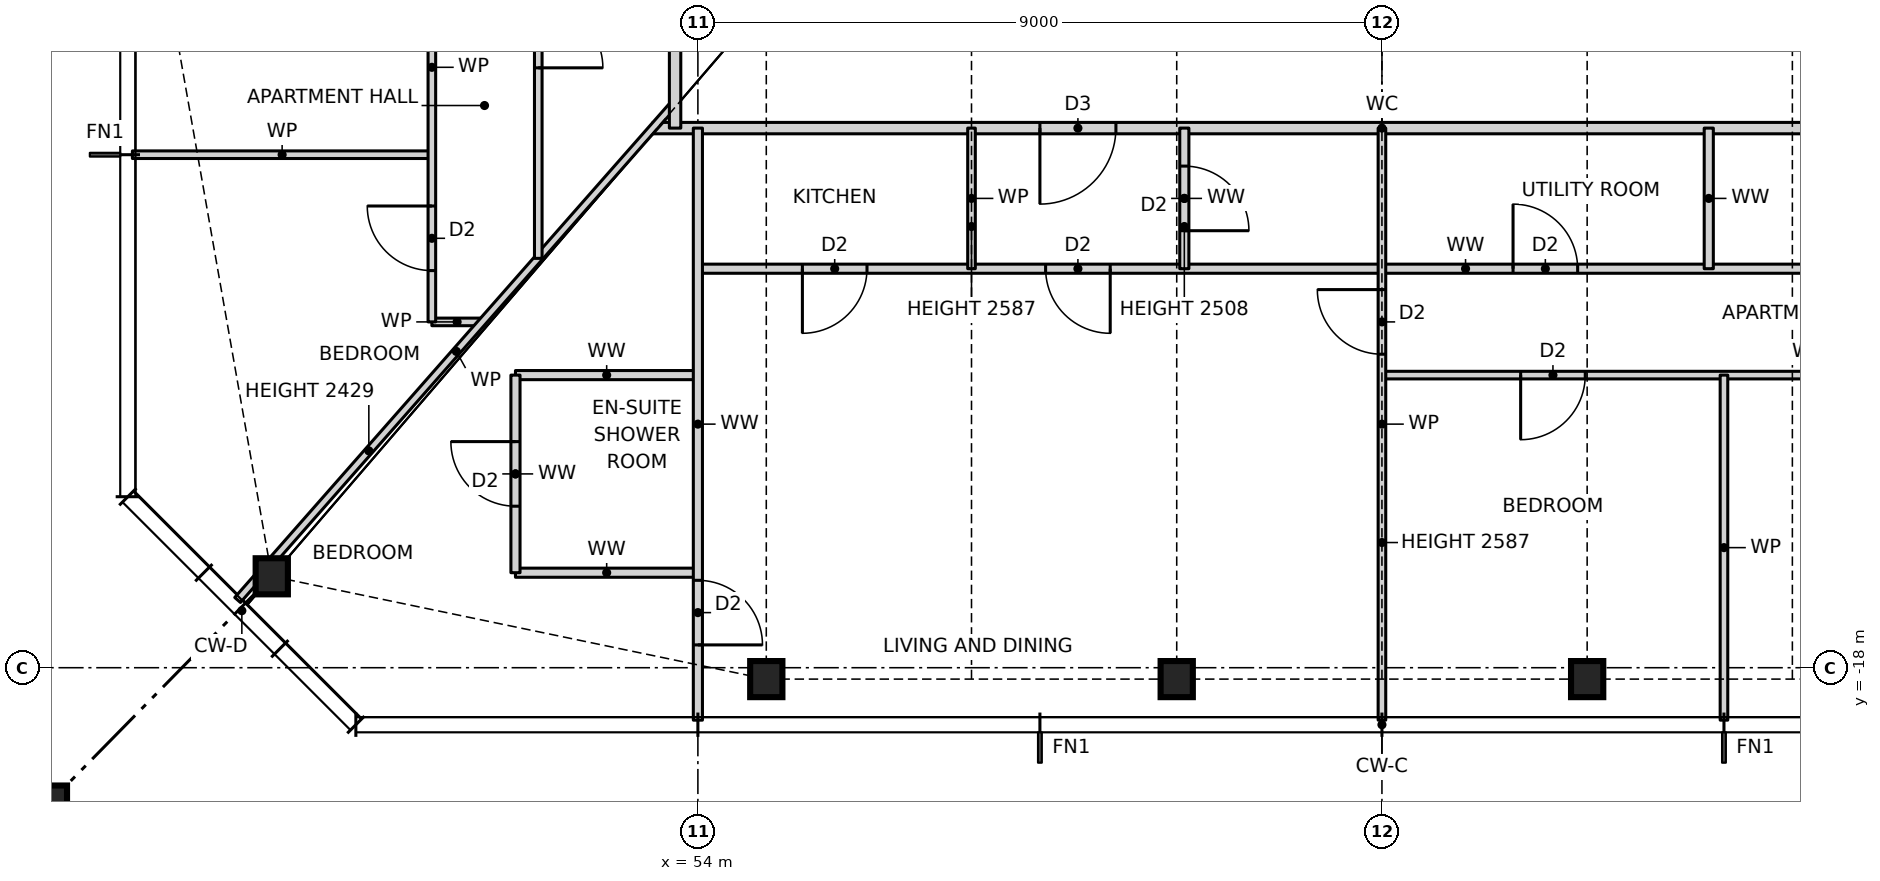
"""IFC4 building model, lengths in metres.
Left out: names, types, materials, properties, quantities, classifications, styles, units other than length and angle.
Written with IfcOpenShell. Run it as: python <this file> out.ifc"""

import sys

from ifc_helpers import new_model, si_unit, direction, frame, frame_2d, origin, origin_2d, place, context, subcontext, project, spatial, rectangle, hollow_rectangle, i_section, extrude, element, fill, save


model = new_model("IFC4")
c1 = context("Model", 3, precision=1e-05, world=origin(), true_north=direction((0.0, 1.0)))
c2 = subcontext(c1, "Body", "Model", "MODEL_VIEW")
j1 = project(units=[si_unit("LENGTHUNIT", "METRE"), si_unit("PLANEANGLEUNIT", "RADIAN")], contexts=[c1])
p1 = place(None, origin())
s1 = spatial("IfcSite", under=j1, at=p1, CompositionType="ELEMENT")
p2 = place(p1, origin())
s2 = spatial("IfcBuilding", under=s1, at=p2, CompositionType="ELEMENT")
p3 = place(p2, frame((0.0, 0.0, 18.5)))
s3 = spatial("IfcBuildingStorey", under=s2, at=p3, CompositionType="ELEMENT", Elevation=18.5)
for number, where, z_axis, x_axis in (
    (1, (48.394, -16.797, 0.0), (0.0, 0.0, 1.0), (1.0, 0.0, 0.0)),
    (2, (54.9, -18.15, 0.0), (0.0, 0.0, 1.0), (1.0, 0.0, 0.0)),
    (3, (60.3, -18.15, 0.0), (0.0, 0.0, 1.0), (1.0, 0.0, 0.0)),
    (4, (65.7, -18.15, 0.0), (0.0, 0.0, 1.0), (1.0, 0.0, 0.0)),
):
    element("IfcColumn", number, at=place(p3, frame(where, z_axis=z_axis, x_axis=x_axis)), inside=s3, PredefinedType="COLUMN", context=c2, shape_type="SweptSolid", body=[
        extrude(i_section(OverallWidth=0.424, OverallDepth=0.475, WebThickness=0.048, FlangeThickness=0.077, at=origin_2d()), origin(), (0.0, 0.0, 1.0), 3.5),
    ])
p4 = place(p3, frame((45.1, -20.15, 0.0), z_axis=(0.0, 0.0, 1.0), x_axis=(1.0, 0.0, 0.0)))
e5 = element("IfcColumn", 5, at=p4, inside=s3, PredefinedType="COLUMN", context=c2, shape_type="SweptSolid", body=[
    extrude(hollow_rectangle(XDim=1.2, YDim=1.2, WallThickness=0.07, at=origin_2d()), origin(), (0.0, 0.0, 1.0), 3.5),
])
for number, where, z_axis, x_axis in (
    (6, (51.6, -16.75, 0.0), (0.0, 0.0, 1.0), (1.0, 0.0, 0.0)),
    (7, (51.6, -14.15, 0.0), (0.0, 0.0, 1.0), (1.0, 0.0, 0.0)),
):
    element("IfcWall", number, at=place(p3, frame(where, z_axis=z_axis, x_axis=x_axis)), inside=s3, PredefinedType="PARTITIONING", context=c2, shape_type="SweptSolid", body=[
        extrude(rectangle(XDim=2.4, YDim=0.12, at=frame_2d((1.2, 0.0))), origin(), (0.0, 0.0, 1.0), 3.27),
    ])
p5 = place(p3, frame((63.0, -14.15, 0.0), z_axis=(0.0, 0.0, 1.0), x_axis=(1.0, 0.0, 0.0)))
e8 = element("IfcWall", 8, at=p5, inside=s3, PredefinedType="PARTITIONING", context=c2, shape_type="SweptSolid", body=[
    extrude(rectangle(XDim=11.2, YDim=0.1, at=frame_2d((5.6, 0.0))), origin(), (0.0, 0.0, 1.0), 3.27),
])
p6 = place(p5, frame((1.825, 0.0, 0.0)))
e9 = element("IfcOpeningElement", 9, at=p6, cuts=e8, PredefinedType="OPENING", context=c2, shape_type="SweptSolid", body=[
    extrude(rectangle(XDim=0.85, YDim=2.1, at=frame_2d((0.425, 1.05))), frame((0.0, 0.06, 0.0), z_axis=(0.0, -1.0, 0.0), x_axis=(1.0, 0.0, 0.0)), (0.0, 0.0, 1.0), 0.12),
])
p7 = place(p5, frame((6.325, 0.0, 0.0)))
e10 = element("IfcOpeningElement", 10, at=p7, cuts=e8, PredefinedType="OPENING", context=c2, shape_type="SweptSolid", body=[
    extrude(rectangle(XDim=0.85, YDim=2.1, at=frame_2d((0.425, 1.05))), frame((0.0, 0.06, 0.0), z_axis=(0.0, -1.0, 0.0), x_axis=(1.0, 0.0, 0.0)), (0.0, 0.0, 1.0), 0.12),
])
p8 = place(p5, frame((9.675, 0.0, 0.0)))
e11 = element("IfcOpeningElement", 11, at=p8, cuts=e8, PredefinedType="OPENING", context=c2, shape_type="SweptSolid", body=[
    extrude(rectangle(XDim=0.85, YDim=2.1, at=frame_2d((0.425, 1.05))), frame((0.0, 0.06, 0.0), z_axis=(0.0, -1.0, 0.0), x_axis=(1.0, 0.0, 0.0)), (0.0, 0.0, 1.0), 0.12),
])
p9 = place(p3, frame((50.5, -13.45, 0.0), z_axis=(0.0, 0.0, 1.0), x_axis=(1.0, 0.0, 0.0)))
e12 = element("IfcWall", 12, at=p9, inside=s3, PredefinedType="PARTITIONING", context=c2, shape_type="SweptSolid", body=[
    extrude(rectangle(XDim=0.664, YDim=0.1, at=frame_2d((0.332, 0.0))), origin(), (0.0, 0.0, 1.0), 3.27),
])
p10 = place(p3, frame((54.0, -12.75, 0.0), z_axis=(0.0, 0.0, 1.0), x_axis=(1.0, 0.0, 0.0)))
e13 = element("IfcWall", 13, at=p10, inside=s3, PredefinedType="PARTITIONING", context=c2, shape_type="SweptSolid", body=[
    extrude(rectangle(XDim=20.2, YDim=0.12, at=frame_2d((10.1, 0.0))), origin(), (0.0, 0.0, 1.0), 3.27),
])
p11 = place(p10, frame((1.375, 0.0, 0.0)))
e14 = element("IfcOpeningElement", 14, at=p11, cuts=e13, PredefinedType="OPENING", context=c2, shape_type="SweptSolid", body=[
    extrude(rectangle(XDim=0.85, YDim=2.1, at=frame_2d((0.425, 1.05))), frame((0.0, 0.07, 0.0), z_axis=(0.0, -1.0, 0.0), x_axis=(1.0, 0.0, 0.0)), (0.0, 0.0, 1.0), 0.14),
])
p12 = place(p10, frame((4.575, 0.0, 0.0)))
e15 = element("IfcOpeningElement", 15, at=p12, cuts=e13, PredefinedType="OPENING", context=c2, shape_type="SweptSolid", body=[
    extrude(rectangle(XDim=0.85, YDim=2.1, at=frame_2d((0.425, 1.05))), frame((0.0, 0.07, 0.0), z_axis=(0.0, -1.0, 0.0), x_axis=(1.0, 0.0, 0.0)), (0.0, 0.0, 1.0), 0.14),
])
p13 = place(p10, frame((10.725, 0.0, 0.0)))
e16 = element("IfcOpeningElement", 16, at=p13, cuts=e13, PredefinedType="OPENING", context=c2, shape_type="SweptSolid", body=[
    extrude(rectangle(XDim=0.85, YDim=2.1, at=frame_2d((0.425, 1.05))), frame((0.0, 0.07, 0.0), z_axis=(0.0, -1.0, 0.0), x_axis=(1.0, 0.0, 0.0)), (0.0, 0.0, 1.0), 0.14),
])
p14 = place(p10, frame((16.325, 0.0, 0.0)))
e17 = element("IfcOpeningElement", 17, at=p14, cuts=e13, PredefinedType="OPENING", context=c2, shape_type="SweptSolid", body=[
    extrude(rectangle(XDim=0.85, YDim=2.1, at=frame_2d((0.425, 1.05))), frame((0.0, 0.07, 0.0), z_axis=(0.0, -1.0, 0.0), x_axis=(1.0, 0.0, 0.0)), (0.0, 0.0, 1.0), 0.14),
])
p15 = place(p3, frame((46.56, -11.25, 0.0), z_axis=(0.0, 0.0, 1.0), x_axis=(1.0, 0.0, 0.0)))
e18 = element("IfcWall", 18, at=p15, inside=s3, PredefinedType="PARTITIONING", context=c2, shape_type="SweptSolid", body=[
    extrude(rectangle(XDim=3.94, YDim=0.1, at=frame_2d((1.97, 0.0))), origin(), (0.0, 0.0, 1.0), 3.27),
])
p16 = place(p3, frame((53.408, -10.9, 0.0), z_axis=(0.0, 0.0, 1.0), x_axis=(1.0, 0.0, 0.0)))
e19 = element("IfcWall", 19, at=p16, inside=s3, PredefinedType="PARTITIONING", context=c2, shape_type="SweptSolid", body=[
    extrude(rectangle(XDim=19.184, YDim=0.15, at=frame_2d((9.592, 0.0))), origin(), (0.0, 0.0, 1.0), 3.27),
])
p17 = place(p16, frame((5.092, 0.0, 0.0)))
e20 = element("IfcOpeningElement", 20, at=p17, cuts=e19, PredefinedType="OPENING", context=c2, shape_type="SweptSolid", body=[
    extrude(rectangle(XDim=1.0, YDim=2.1, at=frame_2d((0.5, 1.05))), frame((0.0, 0.085, 0.0), z_axis=(0.0, -1.0, 0.0), x_axis=(1.0, 0.0, 0.0)), (0.0, 0.0, 1.0), 0.17),
])
p18 = place(p3, frame((47.944, -17.109, 0.0), z_axis=(0.0, 0.0, 1.0), x_axis=(0.660612734851, 0.750726857487, 0.0)))
e21 = element("IfcWall", 21, at=p18, inside=s3, PredefinedType="PARTITIONING", context=c2, shape_type="SweptSolid", body=[
    extrude(rectangle(XDim=8.713, YDim=0.1, at=frame_2d((4.356, 0.0))), origin(), (0.0, 0.0, 1.0), 2.429),
])
p19 = place(p3, frame((67.5, -18.69, 0.0), z_axis=(0.0, 0.0, 1.0), x_axis=(0.0, 1.0, 0.0)))
e22 = element("IfcWall", 22, at=p19, inside=s3, PredefinedType="PARTITIONING", context=c2, shape_type="SweptSolid", body=[
    extrude(rectangle(XDim=4.54, YDim=0.1, at=frame_2d((2.27, 0.0))), origin(), (0.0, 0.0, 1.0), 3.27),
])
p20 = place(p3, frame((67.3, -12.75, 0.0), z_axis=(0.0, 0.0, 1.0), x_axis=(0.0, 1.0, 0.0)))
e23 = element("IfcWall", 23, at=p20, inside=s3, PredefinedType="PARTITIONING", context=c2, shape_type="SweptSolid", body=[
    extrude(rectangle(XDim=1.85, YDim=0.12, at=frame_2d((0.925, 0.0))), origin(), (0.0, 0.0, 1.0), 3.27),
])
p21 = place(p3, frame((63.0, -18.69, 0.0), z_axis=(0.0, 0.0, 1.0), x_axis=(0.0, 1.0, 0.0)))
e24 = element("IfcWall", 24, at=p21, inside=s3, PredefinedType="PARTITIONING", context=c2, shape_type="SweptSolid", body=[
    extrude(rectangle(XDim=7.79, YDim=0.1, at=frame_2d((3.895, 0.0))), origin(), (0.0, 0.0, 1.0), 2.587),
])
p22 = place(p21, frame((4.815, 0.0, 0.0)))
e25 = element("IfcOpeningElement", 25, at=p22, cuts=e24, PredefinedType="OPENING", context=c2, shape_type="SweptSolid", body=[
    extrude(rectangle(XDim=0.85, YDim=2.1, at=frame_2d((0.425, 1.05))), frame((0.0, 0.06, 0.0), z_axis=(0.0, -1.0, 0.0), x_axis=(1.0, 0.0, 0.0)), (0.0, 0.0, 1.0), 0.12),
])
p23 = place(p3, frame((60.4, -12.75, 0.0), z_axis=(0.0, 0.0, 1.0), x_axis=(0.0, 1.0, 0.0)))
e26 = element("IfcWall", 26, at=p23, inside=s3, PredefinedType="PARTITIONING", context=c2, shape_type="SweptSolid", body=[
    extrude(rectangle(XDim=1.85, YDim=0.12, at=frame_2d((0.925, 0.0))), origin(), (0.0, 0.0, 1.0), 2.508),
])
p24 = place(p23, frame((0.5, 0.0, 0.0)))
e27 = element("IfcOpeningElement", 27, at=p24, cuts=e26, PredefinedType="OPENING", context=c2, shape_type="SweptSolid", body=[
    extrude(rectangle(XDim=0.85, YDim=2.1, at=frame_2d((0.425, 1.05))), frame((0.0, 0.07, 0.0), z_axis=(0.0, -1.0, 0.0), x_axis=(1.0, 0.0, 0.0)), (0.0, 0.0, 1.0), 0.14),
])
p25 = place(p3, frame((57.6, -12.75, 0.0), z_axis=(0.0, 0.0, 1.0), x_axis=(0.0, 1.0, 0.0)))
e28 = element("IfcWall", 28, at=p25, inside=s3, PredefinedType="PARTITIONING", context=c2, shape_type="SweptSolid", body=[
    extrude(rectangle(XDim=1.85, YDim=0.1, at=frame_2d((0.925, 0.0))), origin(), (0.0, 0.0, 1.0), 2.587),
])
p26 = place(p3, frame((54.0, -18.69, 0.0), z_axis=(0.0, 0.0, 1.0), x_axis=(0.0, 1.0, 0.0)))
e29 = element("IfcWall", 29, at=p26, inside=s3, PredefinedType="PARTITIONING", context=c2, shape_type="SweptSolid", body=[
    extrude(rectangle(XDim=7.79, YDim=0.12, at=frame_2d((3.895, 0.0))), origin(), (0.0, 0.0, 1.0), 3.27),
])
p27 = place(p26, frame((0.99, 0.0, 0.0)))
e30 = element("IfcOpeningElement", 30, at=p27, cuts=e29, PredefinedType="OPENING", context=c2, shape_type="SweptSolid", body=[
    extrude(rectangle(XDim=0.85, YDim=2.1, at=frame_2d((0.425, 1.05))), frame((0.0, 0.07, 0.0), z_axis=(0.0, -1.0, 0.0), x_axis=(1.0, 0.0, 0.0)), (0.0, 0.0, 1.0), 0.14),
])
p28 = place(p3, frame((53.7, -10.9, 0.0), z_axis=(0.0, 0.0, 1.0), x_axis=(0.0, 1.0, 0.0)))
e31 = element("IfcWall", 31, at=p28, inside=s3, PredefinedType="PARTITIONING", context=c2, shape_type="SweptSolid", body=[
    extrude(rectangle(XDim=21.468, YDim=0.15, at=frame_2d((10.734, 0.0))), origin(), (0.0, 0.0, 1.0), 3.27),
])
p29 = place(p28, frame((7.65, 0.0, 0.0)))
e32 = element("IfcOpeningElement", 32, at=p29, cuts=e31, PredefinedType="OPENING", context=c2, shape_type="SweptSolid", body=[
    extrude(rectangle(XDim=1.0, YDim=2.1, at=frame_2d((0.5, 1.05))), frame((0.0, 0.085, 0.0), z_axis=(0.0, -1.0, 0.0), x_axis=(1.0, 0.0, 0.0)), (0.0, 0.0, 1.0), 0.17),
])
p30 = place(p3, frame((51.9, -12.614, 0.0), z_axis=(0.0, 0.0, 1.0), x_axis=(0.0, 1.0, 0.0)))
e33 = element("IfcWall", 33, at=p30, inside=s3, PredefinedType="PARTITIONING", context=c2, shape_type="SweptSolid", body=[
    extrude(rectangle(XDim=25.228, YDim=0.1, at=frame_2d((12.614, 0.0))), origin(), (0.0, 0.0, 1.0), 3.27),
])
p31 = place(p30, frame((12.639, 0.0, 0.0)))
e34 = element("IfcOpeningElement", 34, at=p31, cuts=e33, PredefinedType="OPENING", context=c2, shape_type="SweptSolid", body=[
    extrude(rectangle(XDim=0.85, YDim=2.1, at=frame_2d((0.425, 1.05))), frame((0.0, 0.06, 0.0), z_axis=(0.0, -1.0, 0.0), x_axis=(1.0, 0.0, 0.0)), (0.0, 0.0, 1.0), 0.12),
])
p32 = place(p30, frame((9.439, 0.0, 0.0)))
e35 = element("IfcOpeningElement", 35, at=p32, cuts=e33, PredefinedType="OPENING", context=c2, shape_type="SweptSolid", body=[
    extrude(rectangle(XDim=0.85, YDim=2.1, at=frame_2d((0.425, 1.05))), frame((0.0, 0.06, 0.0), z_axis=(0.0, -1.0, 0.0), x_axis=(1.0, 0.0, 0.0)), (0.0, 0.0, 1.0), 0.12),
])
p33 = place(p30, frame((16.639, 0.0, 0.0)))
e36 = element("IfcOpeningElement", 36, at=p33, cuts=e33, PredefinedType="OPENING", context=c2, shape_type="SweptSolid", body=[
    extrude(rectangle(XDim=0.85, YDim=2.1, at=frame_2d((0.425, 1.05))), frame((0.0, 0.06, 0.0), z_axis=(0.0, -1.0, 0.0), x_axis=(1.0, 0.0, 0.0)), (0.0, 0.0, 1.0), 0.12),
])
p34 = place(p30, frame((21.821, 0.0, 0.0)))
e37 = element("IfcOpeningElement", 37, at=p34, cuts=e33, PredefinedType="OPENING", context=c2, shape_type="SweptSolid", body=[
    extrude(rectangle(XDim=0.85, YDim=2.1, at=frame_2d((0.425, 1.05))), frame((0.0, 0.06, 0.0), z_axis=(0.0, -1.0, 0.0), x_axis=(1.0, 0.0, 0.0)), (0.0, 0.0, 1.0), 0.12),
])
p35 = place(p30, frame((2.507, 0.0, 0.0)))
e38 = element("IfcOpeningElement", 38, at=p35, cuts=e33, PredefinedType="OPENING", context=c2, shape_type="SweptSolid", body=[
    extrude(rectangle(XDim=0.85, YDim=2.1, at=frame_2d((0.425, 1.05))), frame((0.0, 0.06, 0.0), z_axis=(0.0, -1.0, 0.0), x_axis=(1.0, 0.0, 0.0)), (0.0, 0.0, 1.0), 0.12),
])
p36 = place(p3, frame((51.6, -16.75, 0.0), z_axis=(0.0, 0.0, 1.0), x_axis=(0.0, 1.0, 0.0)))
e39 = element("IfcWall", 39, at=p36, inside=s3, PredefinedType="PARTITIONING", context=c2, shape_type="SweptSolid", body=[
    extrude(rectangle(XDim=2.6, YDim=0.12, at=frame_2d((1.3, 0.0))), origin(), (0.0, 0.0, 1.0), 3.27),
])
p37 = place(p36, frame((0.875, 0.0, 0.0)))
e40 = element("IfcOpeningElement", 40, at=p37, cuts=e39, PredefinedType="OPENING", context=c2, shape_type="SweptSolid", body=[
    extrude(rectangle(XDim=0.85, YDim=2.1, at=frame_2d((0.425, 1.05))), frame((0.0, 0.07, 0.0), z_axis=(0.0, -1.0, 0.0), x_axis=(1.0, 0.0, 0.0)), (0.0, 0.0, 1.0), 0.14),
])
p38 = place(p3, frame((50.5, -13.45, 0.0), z_axis=(0.0, 0.0, 1.0), x_axis=(0.0, 1.0, 0.0)))
e41 = element("IfcWall", 41, at=p38, inside=s3, PredefinedType="PARTITIONING", context=c2, shape_type="SweptSolid", body=[
    extrude(rectangle(XDim=6.7, YDim=0.1, at=frame_2d((3.35, 0.0))), origin(), (0.0, 0.0, 1.0), 3.27),
])
p39 = place(p38, frame((4.025, 0.0, 0.0)))
e42 = element("IfcOpeningElement", 42, at=p39, cuts=e41, PredefinedType="OPENING", context=c2, shape_type="SweptSolid", body=[
    extrude(rectangle(XDim=0.85, YDim=2.1, at=frame_2d((0.425, 1.05))), frame((0.0, 0.06, 0.0), z_axis=(0.0, -1.0, 0.0), x_axis=(1.0, 0.0, 0.0)), (0.0, 0.0, 1.0), 0.12),
])
p40 = place(p38, frame((0.675, 0.0, 0.0)))
e43 = element("IfcOpeningElement", 43, at=p40, cuts=e41, PredefinedType="OPENING", context=c2, shape_type="SweptSolid", body=[
    extrude(rectangle(XDim=0.85, YDim=2.1, at=frame_2d((0.425, 1.05))), frame((0.0, 0.06, 0.0), z_axis=(0.0, -1.0, 0.0), x_axis=(1.0, 0.0, 0.0)), (0.0, 0.0, 1.0), 0.12),
])
p41 = place(p11, frame((0.85, 0.0, 0.0), z_axis=(0.0, 0.0, 1.0), x_axis=(-1.0, 0.0, 0.0)))
e44 = element("IfcDoor", 44, at=p41, inside=s3, OperationType="SINGLE_SWING_RIGHT", PredefinedType="DOOR", context=c2, shape_type="SweptSolid", body=[
    extrude(rectangle(XDim=0.85, YDim=2.1, at=frame_2d((0.425, 1.05))), frame((0.0, 0.025, 0.0), z_axis=(0.0, -1.0, 0.0), x_axis=(1.0, 0.0, 0.0)), (0.0, 0.0, 1.0), 0.05),
])
fill(e14, e44)
p42 = place(p17, frame((1.0, 0.0, 0.0), z_axis=(0.0, 0.0, 1.0), x_axis=(-1.0, 0.0, 0.0)))
e45 = element("IfcDoor", 45, at=p42, inside=s3, OperationType="SINGLE_SWING_RIGHT", PredefinedType="DOOR", context=c2, shape_type="SweptSolid", body=[
    extrude(rectangle(XDim=1.0, YDim=2.1, at=frame_2d((0.5, 1.05))), frame((0.0, 0.025, 0.0), z_axis=(0.0, -1.0, 0.0), x_axis=(1.0, 0.0, 0.0)), (0.0, 0.0, 1.0), 0.05),
])
fill(e20, e45)
p43 = place(p12, frame((0.85, 0.0, 0.0), z_axis=(0.0, 0.0, 1.0), x_axis=(-1.0, 0.0, 0.0)))
e46 = element("IfcDoor", 46, at=p43, inside=s3, OperationType="SINGLE_SWING_LEFT", PredefinedType="DOOR", context=c2, shape_type="SweptSolid", body=[
    extrude(rectangle(XDim=0.85, YDim=2.1, at=frame_2d((0.425, 1.05))), frame((0.0, 0.025, 0.0), z_axis=(0.0, -1.0, 0.0), x_axis=(1.0, 0.0, 0.0)), (0.0, 0.0, 1.0), 0.05),
])
fill(e15, e46)
p44 = place(p24, frame((0.85, 0.0, 0.0), z_axis=(0.0, 0.0, 1.0), x_axis=(-1.0, 0.0, 0.0)))
e47 = element("IfcDoor", 47, at=p44, inside=s3, OperationType="SINGLE_SWING_RIGHT", PredefinedType="DOOR", context=c2, shape_type="SweptSolid", body=[
    extrude(rectangle(XDim=0.85, YDim=2.1, at=frame_2d((0.425, 1.05))), frame((0.0, 0.025, 0.0), z_axis=(0.0, -1.0, 0.0), x_axis=(1.0, 0.0, 0.0)), (0.0, 0.0, 1.0), 0.05),
])
fill(e27, e47)
p45 = place(p37, origin())
e48 = element("IfcDoor", 48, at=p45, inside=s3, OperationType="SINGLE_SWING_RIGHT", PredefinedType="DOOR", context=c2, shape_type="SweptSolid", body=[
    extrude(rectangle(XDim=0.85, YDim=2.1, at=frame_2d((0.425, 1.05))), frame((0.0, 0.025, 0.0), z_axis=(0.0, -1.0, 0.0), x_axis=(1.0, 0.0, 0.0)), (0.0, 0.0, 1.0), 0.05),
])
fill(e40, e48)
p46 = place(p27, frame((0.85, 0.0, 0.0), z_axis=(0.0, 0.0, 1.0), x_axis=(-1.0, 0.0, 0.0)))
e49 = element("IfcDoor", 49, at=p46, inside=s3, OperationType="SINGLE_SWING_RIGHT", PredefinedType="DOOR", context=c2, shape_type="SweptSolid", body=[
    extrude(rectangle(XDim=0.85, YDim=2.1, at=frame_2d((0.425, 1.05))), frame((0.0, 0.025, 0.0), z_axis=(0.0, -1.0, 0.0), x_axis=(1.0, 0.0, 0.0)), (0.0, 0.0, 1.0), 0.05),
])
fill(e30, e49)
p47 = place(p22, origin())
e50 = element("IfcDoor", 50, at=p47, inside=s3, OperationType="SINGLE_SWING_RIGHT", PredefinedType="DOOR", context=c2, shape_type="SweptSolid", body=[
    extrude(rectangle(XDim=0.85, YDim=2.1, at=frame_2d((0.425, 1.05))), frame((0.0, 0.025, 0.0), z_axis=(0.0, -1.0, 0.0), x_axis=(1.0, 0.0, 0.0)), (0.0, 0.0, 1.0), 0.05),
])
fill(e25, e50)
p48 = place(p6, frame((0.85, 0.0, 0.0), z_axis=(0.0, 0.0, 1.0), x_axis=(-1.0, 0.0, 0.0)))
e51 = element("IfcDoor", 51, at=p48, inside=s3, OperationType="SINGLE_SWING_RIGHT", PredefinedType="DOOR", context=c2, shape_type="SweptSolid", body=[
    extrude(rectangle(XDim=0.85, YDim=2.1, at=frame_2d((0.425, 1.05))), frame((0.0, 0.025, 0.0), z_axis=(0.0, -1.0, 0.0), x_axis=(1.0, 0.0, 0.0)), (0.0, 0.0, 1.0), 0.05),
])
fill(e9, e51)
p49 = place(p13, origin())
e52 = element("IfcDoor", 52, at=p49, inside=s3, OperationType="SINGLE_SWING_LEFT", PredefinedType="DOOR", context=c2, shape_type="SweptSolid", body=[
    extrude(rectangle(XDim=0.85, YDim=2.1, at=frame_2d((0.425, 1.05))), frame((0.0, 0.025, 0.0), z_axis=(0.0, -1.0, 0.0), x_axis=(1.0, 0.0, 0.0)), (0.0, 0.0, 1.0), 0.05),
])
fill(e16, e52)
p50 = place(p40, origin())
e53 = element("IfcDoor", 53, at=p50, inside=s3, OperationType="SINGLE_SWING_RIGHT", PredefinedType="DOOR", context=c2, shape_type="SweptSolid", body=[
    extrude(rectangle(XDim=0.85, YDim=2.1, at=frame_2d((0.425, 1.05))), frame((0.0, 0.025, 0.0), z_axis=(0.0, -1.0, 0.0), x_axis=(1.0, 0.0, 0.0)), (0.0, 0.0, 1.0), 0.05),
])
fill(e43, e53)
p51 = place(p35, frame((0.85, 0.0, 0.0), z_axis=(0.0, 0.0, 1.0), x_axis=(-1.0, 0.0, 0.0)))
e54 = element("IfcDoor", 54, at=p51, inside=s3, OperationType="SINGLE_SWING_RIGHT", PredefinedType="DOOR", context=c2, shape_type="SweptSolid", body=[
    extrude(rectangle(XDim=0.85, YDim=2.1, at=frame_2d((0.425, 1.05))), frame((0.0, 0.025, 0.0), z_axis=(0.0, -1.0, 0.0), x_axis=(1.0, 0.0, 0.0)), (0.0, 0.0, 1.0), 0.05),
])
fill(e38, e54)
save(model, sys.argv[1])
